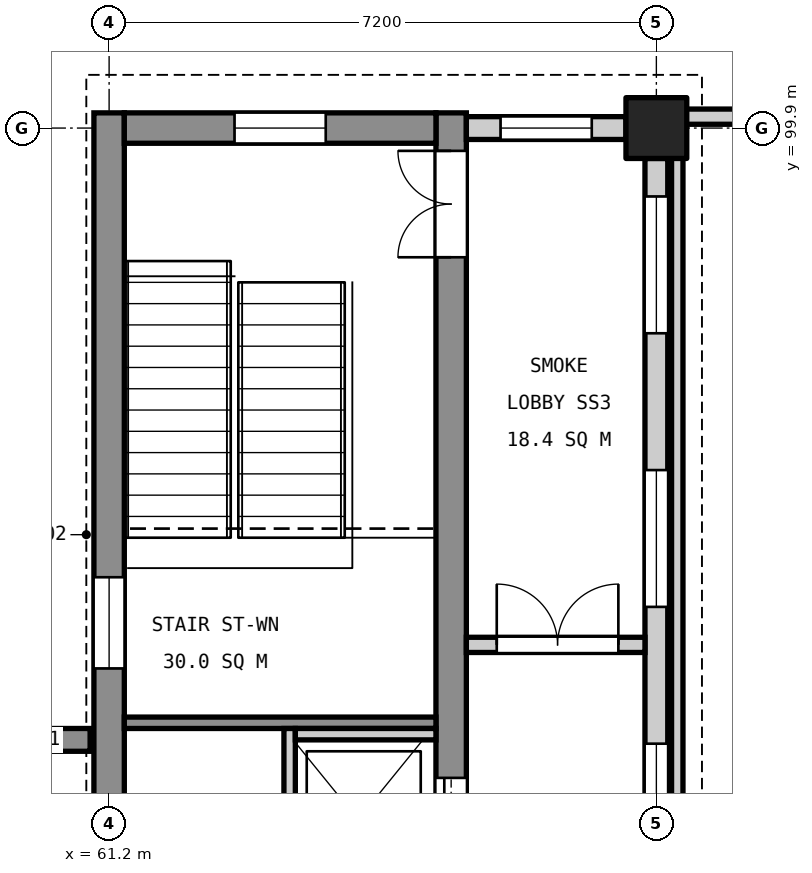
"""IFC4 building model, lengths in metres.
Left out: names, types, materials, properties, quantities, classifications, styles, units other than length and angle.
Written with IfcOpenShell. Run it as: python <this file> out.ifc"""

import sys

from ifc_helpers import new_model, si_unit, direction, frame, frame_2d, origin, origin_2d, place, context, subcontext, project, spatial, rectangle, extrude, element, fill, save


model = new_model("IFC4")
c1 = context("Model", 3, precision=1e-05, world=origin(), true_north=direction((0.0, 1.0)))
c2 = subcontext(c1, "Body", "Model", "MODEL_VIEW")
j1 = project(units=[si_unit("LENGTHUNIT", "METRE"), si_unit("PLANEANGLEUNIT", "RADIAN")], contexts=[c1])
p1 = place(None, origin())
s1 = spatial("IfcSite", under=j1, at=p1, CompositionType="ELEMENT")
p2 = place(p1, origin())
s2 = spatial("IfcBuilding", under=s1, at=p2, CompositionType="ELEMENT")
p3 = place(p2, frame((0.0, 0.0, 65.4)))
s3 = spatial("IfcBuildingStorey", under=s2, at=p3, CompositionType="ELEMENT", Elevation=65.4)
p4 = place(p3, frame((68.4, 99.9, 0.0), z_axis=(0.0, 0.0, 1.0), x_axis=(1.0, 0.0, 0.0)))
e1 = element("IfcColumn", 1, at=p4, inside=s3, PredefinedType="COLUMN", context=c2, shape_type="SweptSolid", body=[
    extrude(rectangle(XDim=0.8, YDim=0.8, at=origin_2d()), origin(), (0.0, 0.0, 1.0), 4.8),
])
p5 = place(p3, frame((61.2, 88.9, 0.0), z_axis=(0.0, 0.0, 1.0), x_axis=(0.0, 1.0, 0.0)))
e2 = element("IfcWall", 2, at=p5, inside=s3, PredefinedType="SHEAR", context=c2, shape_type="SweptSolid", body=[
    extrude(rectangle(XDim=11.2, YDim=0.4, at=frame_2d((5.6, 0.0))), origin(), (0.0, 0.0, 1.0), 4.55),
])
p6 = place(p5, frame((3.89, 0.0, 3.4)))
e3 = element("IfcOpeningElement", 3, at=p6, cuts=e2, PredefinedType="OPENING", context=c2, shape_type="SweptSolid", body=[
    extrude(rectangle(XDim=1.2, YDim=0.9, at=frame_2d((0.6, 0.45))), frame((0.0, 0.21, 0.0), z_axis=(0.0, -1.0, 0.0), x_axis=(1.0, 0.0, 0.0)), (0.0, 0.0, 1.0), 0.42),
])
p7 = place(p3, frame((65.7, 88.9, 0.0), z_axis=(0.0, 0.0, 1.0), x_axis=(0.0, 1.0, 0.0)))
e4 = element("IfcWall", 4, at=p7, inside=s3, PredefinedType="SHEAR", context=c2, shape_type="SweptSolid", body=[
    extrude(rectangle(XDim=11.2, YDim=0.4, at=frame_2d((5.6, 0.0))), origin(), (0.0, 0.0, 1.0), 4.55),
])
p8 = place(p7, frame((9.3, 0.0, 0.0)))
e5 = element("IfcOpeningElement", 5, at=p8, cuts=e4, PredefinedType="OPENING", context=c2, shape_type="SweptSolid", body=[
    extrude(rectangle(XDim=1.4, YDim=2.1, at=frame_2d((0.7, 1.05))), frame((0.0, 0.21, 0.0), z_axis=(0.0, -1.0, 0.0), x_axis=(1.0, 0.0, 0.0)), (0.0, 0.0, 1.0), 0.42),
])
p9 = place(p7, frame((1.35, 0.0, 0.0)))
e6 = element("IfcOpeningElement", 6, at=p9, cuts=e4, PredefinedType="OPENING", context=c2, shape_type="SweptSolid", body=[
    extrude(rectangle(XDim=1.1, YDim=2.1, at=frame_2d((0.55, 1.05))), frame((0.0, 0.21, 0.0), z_axis=(0.0, -1.0, 0.0), x_axis=(1.0, 0.0, 0.0)), (0.0, 0.0, 1.0), 0.42),
])
p10 = place(p3, frame((61.4, 99.9, 0.0), z_axis=(0.0, 0.0, 1.0), x_axis=(1.0, 0.0, 0.0)))
e7 = element("IfcWall", 7, at=p10, inside=s3, PredefinedType="SHEAR", context=c2, shape_type="SweptSolid", body=[
    extrude(rectangle(XDim=4.1, YDim=0.4, at=frame_2d((2.05, 0.0))), origin(), (0.0, 0.0, 1.0), 4.55),
])
p11 = place(p10, frame((1.45, 0.0, 3.4)))
e8 = element("IfcOpeningElement", 8, at=p11, cuts=e7, PredefinedType="OPENING", context=c2, shape_type="SweptSolid", body=[
    extrude(rectangle(XDim=1.2, YDim=0.9, at=frame_2d((0.6, 0.45))), frame((0.0, 0.21, 0.0), z_axis=(0.0, -1.0, 0.0), x_axis=(1.0, 0.0, 0.0)), (0.0, 0.0, 1.0), 0.42),
])
p12 = place(p3, frame((60.95, 91.85, 0.0), z_axis=(0.0, 0.0, 1.0), x_axis=(-1.0, 0.0, 0.0)))
e9 = element("IfcWall", 9, at=p12, inside=s3, PredefinedType="SHEAR", context=c2, shape_type="SweptSolid", body=[
    extrude(rectangle(XDim=1.25, YDim=0.3, at=frame_2d((0.625, 0.0))), origin(), (0.0, 0.0, 1.0), 4.8),
])
p13 = place(p3, frame((61.4, 92.075, 0.0), z_axis=(0.0, 0.0, 1.0), x_axis=(1.0, 0.0, 0.0)))
e10 = element("IfcWall", 10, at=p13, inside=s3, PredefinedType="SOLIDWALL", context=c2, shape_type="SweptSolid", body=[
    extrude(rectangle(XDim=4.1, YDim=0.15, at=frame_2d((2.05, 0.0))), origin(), (0.0, 0.0, 1.0), 4.55),
])
p14 = place(p3, frame((63.575, 92.0, 0.0), z_axis=(0.0, 0.0, 1.0), x_axis=(0.0, -1.0, 0.0)))
e11 = element("IfcWall", 11, at=p14, inside=s3, PredefinedType="SOLIDWALL", context=c2, shape_type="SweptSolid", body=[
    extrude(rectangle(XDim=2.7, YDim=0.15, at=frame_2d((1.35, 0.0))), origin(), (0.0, 0.0, 1.0), 4.8),
])
p15 = place(p3, frame((63.65, 91.925, 0.0), z_axis=(0.0, 0.0, 1.0), x_axis=(1.0, 0.0, 0.0)))
e12 = element("IfcWall", 12, at=p15, inside=s3, PredefinedType="SOLIDWALL", context=c2, shape_type="SweptSolid", body=[
    extrude(rectangle(XDim=1.85, YDim=0.15, at=frame_2d((0.925, 0.0))), origin(), (0.0, 0.0, 1.0), 4.8),
])
p16 = place(p3, frame((68.75, 100.05, 0.0), z_axis=(0.0, 0.0, 1.0), x_axis=(1.0, 0.0, 0.0)))
e13 = element("IfcWall", 13, at=p16, inside=s3, PredefinedType="PARAPET", context=c2, shape_type="SweptSolid", body=[
    extrude(rectangle(XDim=10.8, YDim=0.2, at=frame_2d((5.4, 0.0))), origin(), (0.0, 0.0, 1.0), 1.2),
])
p17 = place(p3, frame((68.675, 35.05, 0.0), z_axis=(0.0, 0.0, 1.0), x_axis=(0.0, 1.0, 0.0)))
e14 = element("IfcWall", 14, at=p17, inside=s3, PredefinedType="PARAPET", context=c2, shape_type="SweptSolid", body=[
    extrude(rectangle(XDim=64.9, YDim=0.15, at=frame_2d((32.45, 0.0))), origin(), (0.0, 0.0, 1.0), 0.3),
])
p18 = place(p3, frame((65.9, 99.9, 0.0), z_axis=(0.0, 0.0, 1.0), x_axis=(1.0, 0.0, 0.0)))
e15 = element("IfcWall", 15, at=p18, inside=s3, PredefinedType="STANDARD", context=c2, shape_type="SweptSolid", body=[
    extrude(rectangle(XDim=2.1, YDim=0.3, at=frame_2d((1.05, 0.0))), origin(), (0.0, 0.0, 1.0), 3.85),
])
p19 = place(p18, frame((0.45, 0.0, 0.9)))
e16 = element("IfcOpeningElement", 16, at=p19, cuts=e15, PredefinedType="OPENING", context=c2, shape_type="SweptSolid", body=[
    extrude(rectangle(XDim=1.2, YDim=2.4, at=frame_2d((0.6, 1.2))), frame((0.0, 0.16, 0.0), z_axis=(0.0, -1.0, 0.0), x_axis=(1.0, 0.0, 0.0)), (0.0, 0.0, 1.0), 0.32),
])
p20 = place(p3, frame((68.4, 89.5, 0.0), z_axis=(0.0, 0.0, 1.0), x_axis=(0.0, 1.0, 0.0)))
e17 = element("IfcWall", 17, at=p20, inside=s3, PredefinedType="STANDARD", context=c2, shape_type="SweptSolid", body=[
    extrude(rectangle(XDim=10.0, YDim=0.3, at=frame_2d((5.0, 0.0))), origin(), (0.0, 0.0, 1.0), 3.55),
])
p21 = place(p20, frame((0.5, 0.0, 0.9)))
e18 = element("IfcOpeningElement", 18, at=p21, cuts=e17, PredefinedType="OPENING", context=c2, shape_type="SweptSolid", body=[
    extrude(rectangle(XDim=1.8, YDim=2.4, at=frame_2d((0.9, 1.2))), frame((0.0, 0.16, 0.0), z_axis=(0.0, -1.0, 0.0), x_axis=(1.0, 0.0, 0.0)), (0.0, 0.0, 1.0), 0.32),
])
p22 = place(p20, frame((4.1, 0.0, 0.9)))
e19 = element("IfcOpeningElement", 19, at=p22, cuts=e17, PredefinedType="OPENING", context=c2, shape_type="SweptSolid", body=[
    extrude(rectangle(XDim=1.8, YDim=2.4, at=frame_2d((0.9, 1.2))), frame((0.0, 0.16, 0.0), z_axis=(0.0, -1.0, 0.0), x_axis=(1.0, 0.0, 0.0)), (0.0, 0.0, 1.0), 0.32),
])
p23 = place(p20, frame((7.7, 0.0, 0.9)))
e20 = element("IfcOpeningElement", 20, at=p23, cuts=e17, PredefinedType="OPENING", context=c2, shape_type="SweptSolid", body=[
    extrude(rectangle(XDim=1.8, YDim=2.4, at=frame_2d((0.9, 1.2))), frame((0.0, 0.16, 0.0), z_axis=(0.0, -1.0, 0.0), x_axis=(1.0, 0.0, 0.0)), (0.0, 0.0, 1.0), 0.32),
])
p24 = place(p3, frame((65.9, 93.1, 0.0), z_axis=(0.0, 0.0, 1.0), x_axis=(1.0, 0.0, 0.0)))
e21 = element("IfcWall", 21, at=p24, inside=s3, PredefinedType="PARTITIONING", context=c2, shape_type="SweptSolid", body=[
    extrude(rectangle(XDim=2.35, YDim=0.2, at=frame_2d((1.175, 0.0))), origin(), (0.0, 0.0, 1.0), 3.55),
])
p25 = place(p24, frame((0.4, 0.0, 0.0)))
e22 = element("IfcOpeningElement", 22, at=p25, cuts=e21, PredefinedType="OPENING", context=c2, shape_type="SweptSolid", body=[
    extrude(rectangle(XDim=1.6, YDim=2.1, at=frame_2d((0.8, 1.05))), frame((0.0, 0.11, 0.0), z_axis=(0.0, -1.0, 0.0), x_axis=(1.0, 0.0, 0.0)), (0.0, 0.0, 1.0), 0.22),
])
p26 = place(p8, origin())
e23 = element("IfcDoor", 23, at=p26, inside=s3, OperationType="DOUBLE_DOOR_SINGLE_SWING", PredefinedType="DOOR", context=c2, shape_type="SweptSolid", body=[
    extrude(rectangle(XDim=1.4, YDim=2.1, at=frame_2d((0.7, 1.05))), frame((0.0, 0.025, 0.0), z_axis=(0.0, -1.0, 0.0), x_axis=(1.0, 0.0, 0.0)), (0.0, 0.0, 1.0), 0.05),
])
fill(e5, e23)
p27 = place(p9, origin())
e24 = element("IfcDoor", 24, at=p27, inside=s3, OperationType="SLIDING_TO_LEFT", PredefinedType="DOOR", context=c2, shape_type="SweptSolid", body=[
    extrude(rectangle(XDim=1.1, YDim=2.1, at=frame_2d((0.55, 1.05))), frame((0.0, 0.025, 0.0), z_axis=(0.0, -1.0, 0.0), x_axis=(1.0, 0.0, 0.0)), (0.0, 0.0, 1.0), 0.05),
])
fill(e6, e24)
p28 = place(p19, origin())
e25 = element("IfcWindow", 25, at=p28, inside=s3, PartitioningType="SINGLE_PANEL", PredefinedType="WINDOW", context=c2, shape_type="SweptSolid", body=[
    extrude(rectangle(XDim=1.2, YDim=2.4, at=frame_2d((0.6, 1.2))), frame((0.0, 0.03, 0.0), z_axis=(0.0, -1.0, 0.0), x_axis=(1.0, 0.0, 0.0)), (0.0, 0.0, 1.0), 0.06),
])
fill(e16, e25)
p29 = place(p21, origin())
e26 = element("IfcWindow", 26, at=p29, inside=s3, PartitioningType="SINGLE_PANEL", PredefinedType="WINDOW", context=c2, shape_type="SweptSolid", body=[
    extrude(rectangle(XDim=1.8, YDim=2.4, at=frame_2d((0.9, 1.2))), frame((0.0, 0.03, 0.0), z_axis=(0.0, -1.0, 0.0), x_axis=(1.0, 0.0, 0.0)), (0.0, 0.0, 1.0), 0.06),
])
fill(e18, e26)
p30 = place(p22, origin())
e27 = element("IfcWindow", 27, at=p30, inside=s3, PartitioningType="SINGLE_PANEL", PredefinedType="WINDOW", context=c2, shape_type="SweptSolid", body=[
    extrude(rectangle(XDim=1.8, YDim=2.4, at=frame_2d((0.9, 1.2))), frame((0.0, 0.03, 0.0), z_axis=(0.0, -1.0, 0.0), x_axis=(1.0, 0.0, 0.0)), (0.0, 0.0, 1.0), 0.06),
])
fill(e19, e27)
p31 = place(p23, origin())
e28 = element("IfcWindow", 28, at=p31, inside=s3, PartitioningType="SINGLE_PANEL", PredefinedType="WINDOW", context=c2, shape_type="SweptSolid", body=[
    extrude(rectangle(XDim=1.8, YDim=2.4, at=frame_2d((0.9, 1.2))), frame((0.0, 0.03, 0.0), z_axis=(0.0, -1.0, 0.0), x_axis=(1.0, 0.0, 0.0)), (0.0, 0.0, 1.0), 0.06),
])
fill(e20, e28)
p32 = place(p6, origin())
e29 = element("IfcWindow", 29, at=p32, inside=s3, PartitioningType="SINGLE_PANEL", PredefinedType="WINDOW", context=c2, shape_type="SweptSolid", body=[
    extrude(rectangle(XDim=1.2, YDim=0.9, at=frame_2d((0.6, 0.45))), frame((0.0, 0.03, 0.0), z_axis=(0.0, -1.0, 0.0), x_axis=(1.0, 0.0, 0.0)), (0.0, 0.0, 1.0), 0.06),
])
fill(e3, e29)
p33 = place(p11, origin())
e30 = element("IfcWindow", 30, at=p33, inside=s3, PartitioningType="SINGLE_PANEL", PredefinedType="WINDOW", context=c2, shape_type="SweptSolid", body=[
    extrude(rectangle(XDim=1.2, YDim=0.9, at=frame_2d((0.6, 0.45))), frame((0.0, 0.03, 0.0), z_axis=(0.0, -1.0, 0.0), x_axis=(1.0, 0.0, 0.0)), (0.0, 0.0, 1.0), 0.06),
])
fill(e8, e30)
p34 = place(p25, origin())
e31 = element("IfcDoor", 31, at=p34, inside=s3, OperationType="DOUBLE_DOOR_SINGLE_SWING", PredefinedType="DOOR", context=c2, shape_type="SweptSolid", body=[
    extrude(rectangle(XDim=1.6, YDim=2.1, at=frame_2d((0.8, 1.05))), frame((0.0, 0.025, 0.0), z_axis=(0.0, -1.0, 0.0), x_axis=(1.0, 0.0, 0.0)), (0.0, 0.0, 1.0), 0.05),
])
fill(e22, e31)
save(model, sys.argv[1])
